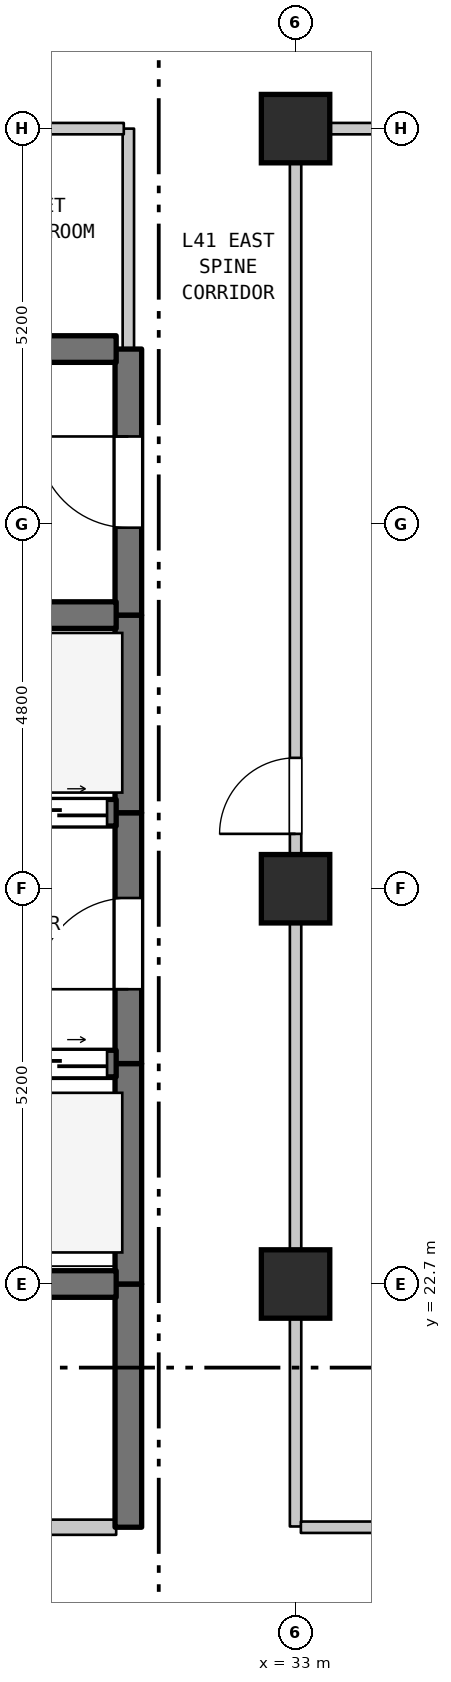
"""IFC4 building model, lengths in metres.
Left out: names, types, materials, properties, quantities, classifications, styles, units other than length and angle.
Written with IfcOpenShell. Run it as: python <this file> out.ifc"""

import sys

from ifc_helpers import new_model, si_unit, direction, frame, frame_2d, origin, origin_2d, place, context, subcontext, project, spatial, rectangle, extrude, element, fill, save


model = new_model("IFC4")
c1 = context("Model", 3, precision=1e-05, world=origin(), true_north=direction((0.0, 1.0)))
c2 = subcontext(c1, "Body", "Model", "MODEL_VIEW")
j1 = project(units=[si_unit("LENGTHUNIT", "METRE"), si_unit("PLANEANGLEUNIT", "RADIAN")], contexts=[c1])
p1 = place(None, origin())
s1 = spatial("IfcSite", under=j1, at=p1, CompositionType="ELEMENT")
p2 = place(p1, origin())
s2 = spatial("IfcBuilding", under=s1, at=p2, CompositionType="ELEMENT")
p3 = place(p2, frame((0.0, 0.0, 169.1)))
s3 = spatial("IfcBuildingStorey", under=s2, at=p3, CompositionType="ELEMENT", Elevation=169.1)
for number, where, z_axis, x_axis in (
    (1, (33.0, 22.7, 0.0), (0.0, 0.0, 1.0), (1.0, 0.0, 0.0)),
    (2, (33.0, 27.9, 0.0), (0.0, 0.0, 1.0), (1.0, 0.0, 0.0)),
    (3, (33.0, 37.9, 0.0), (0.0, 0.0, 1.0), (1.0, 0.0, 0.0)),
):
    element("IfcColumn", number, at=place(p3, frame(where, z_axis=z_axis, x_axis=x_axis)), inside=s3, PredefinedType="COLUMN", context=c2, shape_type="SweptSolid", body=[
        extrude(rectangle(XDim=0.9, YDim=0.9, at=origin_2d()), origin(), (0.0, 0.0, 1.0), 3.7),
    ])
p4 = place(p3, frame((30.8, 19.5, 0.0), z_axis=(0.0, 0.0, 1.0), x_axis=(0.0, 1.0, 0.0)))
e4 = element("IfcWall", 4, at=p4, inside=s3, PredefinedType="SHEAR", context=c2, shape_type="SweptSolid", body=[
    extrude(rectangle(XDim=3.2, YDim=0.35, at=frame_2d((1.6, 0.0))), origin(), (0.0, 0.0, 1.0), 3.39),
])
p5 = place(p3, frame((30.8, 22.7, 0.0), z_axis=(0.0, 0.0, 1.0), x_axis=(0.0, 1.0, 0.0)))
e5 = element("IfcWall", 5, at=p5, inside=s3, PredefinedType="SHEAR", context=c2, shape_type="SweptSolid", body=[
    extrude(rectangle(XDim=2.9, YDim=0.35, at=frame_2d((1.45, 0.0))), origin(), (0.0, 0.0, 1.0), 3.39),
])
p6 = place(p3, frame((30.8, 25.6, 0.0), z_axis=(0.0, 0.0, 1.0), x_axis=(0.0, 1.0, 0.0)))
e6 = element("IfcWall", 6, at=p6, inside=s3, PredefinedType="SHEAR", context=c2, shape_type="SweptSolid", body=[
    extrude(rectangle(XDim=3.3, YDim=0.35, at=frame_2d((1.65, 0.0))), origin(), (0.0, 0.0, 1.0), 3.39),
])
p7 = place(p6, frame((0.978, 0.0, 0.0)))
e7 = element("IfcOpeningElement", 7, at=p7, cuts=e6, PredefinedType="OPENING", context=c2, shape_type="SweptSolid", body=[
    extrude(rectangle(XDim=1.2, YDim=2.2, at=frame_2d((0.6, 1.1))), frame((0.0, 0.185, 0.0), z_axis=(0.0, -1.0, 0.0), x_axis=(1.0, 0.0, 0.0)), (0.0, 0.0, 1.0), 0.37),
])
p8 = place(p3, frame((30.8, 28.9, 0.0), z_axis=(0.0, 0.0, 1.0), x_axis=(0.0, 1.0, 0.0)))
e8 = element("IfcWall", 8, at=p8, inside=s3, PredefinedType="SHEAR", context=c2, shape_type="SweptSolid", body=[
    extrude(rectangle(XDim=2.6, YDim=0.35, at=frame_2d((1.3, 0.0))), origin(), (0.0, 0.0, 1.0), 3.39),
])
p9 = place(p3, frame((30.8, 31.5, 0.0), z_axis=(0.0, 0.0, 1.0), x_axis=(0.0, 1.0, 0.0)))
e9 = element("IfcWall", 9, at=p9, inside=s3, PredefinedType="SHEAR", context=c2, shape_type="SweptSolid", body=[
    extrude(rectangle(XDim=3.5, YDim=0.35, at=frame_2d((1.75, 0.0))), origin(), (0.0, 0.0, 1.0), 3.39),
])
p10 = place(p9, frame((1.15, 0.0, 0.0)))
e10 = element("IfcOpeningElement", 10, at=p10, cuts=e9, PredefinedType="OPENING", context=c2, shape_type="SweptSolid", body=[
    extrude(rectangle(XDim=1.2, YDim=2.2, at=frame_2d((0.6, 1.1))), frame((0.0, 0.185, 0.0), z_axis=(0.0, -1.0, 0.0), x_axis=(1.0, 0.0, 0.0)), (0.0, 0.0, 1.0), 0.37),
])
p11 = place(p3, frame((30.8, 35.0, 0.0), z_axis=(0.0, 0.0, 1.0), x_axis=(0.0, 1.0, 0.0)))
e11 = element("IfcWall", 11, at=p11, inside=s3, PredefinedType="STANDARD", context=c2, shape_type="SweptSolid", body=[
    extrude(rectangle(XDim=2.9, YDim=0.15, at=frame_2d((1.45, 0.0))), origin(), (0.0, 0.0, 1.0), 3.39),
])
p12 = place(p3, frame((33.0, 19.51, 0.0), z_axis=(0.0, 0.0, 1.0), x_axis=(0.0, 1.0, 0.0)))
e12 = element("IfcWall", 12, at=p12, inside=s3, PredefinedType="STANDARD", context=c2, shape_type="SweptSolid", body=[
    extrude(rectangle(XDim=8.39, YDim=0.15, at=frame_2d((4.195, 0.0))), origin(), (0.0, 0.0, 1.0), 2.99),
])
p13 = place(p3, frame((25.985, 19.5, 0.0), z_axis=(0.0, 0.0, 1.0), x_axis=(1.0, 0.0, 0.0)))
e13 = element("IfcWall", 13, at=p13, inside=s3, PredefinedType="STANDARD", context=c2, shape_type="SweptSolid", body=[
    extrude(rectangle(XDim=4.655, YDim=0.2, at=frame_2d((2.327, 0.0))), origin(), (0.0, 0.0, 1.0), 3.39),
])
p14 = place(p13, frame((1.845, 0.0, 0.0)))
e14 = element("IfcOpeningElement", 14, at=p14, cuts=e13, PredefinedType="OPENING", context=c2, shape_type="SweptSolid", body=[
    extrude(rectangle(XDim=0.9, YDim=2.15, at=frame_2d((0.45, 1.075))), frame((0.0, 0.11, 0.0), z_axis=(0.0, -1.0, 0.0), x_axis=(1.0, 0.0, 0.0)), (0.0, 0.0, 1.0), 0.22),
])
p15 = place(p3, frame((33.07, 19.5, 0.0), z_axis=(0.0, 0.0, 1.0), x_axis=(1.0, 0.0, 0.0)))
e15 = element("IfcWall", 15, at=p15, inside=s3, PredefinedType="STANDARD", context=c2, shape_type="SweptSolid", body=[
    extrude(rectangle(XDim=21.51, YDim=0.15, at=frame_2d((10.755, 0.0))), origin(), (0.0, 0.0, 1.0), 3.39),
])
p16 = place(p15, frame((10.185, 0.0, 0.0)))
e16 = element("IfcOpeningElement", 16, at=p16, cuts=e15, PredefinedType="OPENING", context=c2, shape_type="SweptSolid", body=[
    extrude(rectangle(XDim=1.0, YDim=2.15, at=frame_2d((0.5, 1.075))), frame((0.0, 0.085, 0.0), z_axis=(0.0, -1.0, 0.0), x_axis=(1.0, 0.0, 0.0)), (0.0, 0.0, 1.0), 0.17),
])
p17 = place(p3, frame((27.46, 22.7, 0.0), z_axis=(0.0, 0.0, 1.0), x_axis=(1.0, 0.0, 0.0)))
e17 = element("IfcWall", 17, at=p17, inside=s3, PredefinedType="SHEAR", context=c2, shape_type="SweptSolid", body=[
    extrude(rectangle(XDim=3.18, YDim=0.35, at=frame_2d((1.59, 0.0))), origin(), (0.0, 0.0, 1.0), 3.39),
])
p18 = place(p3, frame((27.46, 25.6, 0.0), z_axis=(0.0, 0.0, 1.0), x_axis=(1.0, 0.0, 0.0)))
e18 = element("IfcWall", 18, at=p18, inside=s3, PredefinedType="SHEAR", context=c2, shape_type="SweptSolid", body=[
    extrude(rectangle(XDim=3.18, YDim=0.35, at=frame_2d((1.59, 0.0))), origin(), (0.0, 0.0, 1.0), 3.39),
])
p19 = place(p18, frame((0.12, 0.0, 0.0)))
e19 = element("IfcOpeningElement", 19, at=p19, cuts=e18, PredefinedType="OPENING", context=c2, shape_type="SweptSolid", body=[
    extrude(rectangle(XDim=1.25, YDim=2.2, at=frame_2d((0.625, 1.1))), frame((0.0, 0.185, 0.0), z_axis=(0.0, -1.0, 0.0), x_axis=(1.0, 0.0, 0.0)), (0.0, 0.0, 1.0), 0.37),
])
p20 = place(p18, frame((1.81, 0.0, 0.0)))
e20 = element("IfcOpeningElement", 20, at=p20, cuts=e18, PredefinedType="OPENING", context=c2, shape_type="SweptSolid", body=[
    extrude(rectangle(XDim=1.25, YDim=2.2, at=frame_2d((0.625, 1.1))), frame((0.0, 0.185, 0.0), z_axis=(0.0, -1.0, 0.0), x_axis=(1.0, 0.0, 0.0)), (0.0, 0.0, 1.0), 0.37),
])
p21 = place(p3, frame((27.46, 28.9, 0.0), z_axis=(0.0, 0.0, 1.0), x_axis=(1.0, 0.0, 0.0)))
e21 = element("IfcWall", 21, at=p21, inside=s3, PredefinedType="SHEAR", context=c2, shape_type="SweptSolid", body=[
    extrude(rectangle(XDim=3.18, YDim=0.35, at=frame_2d((1.59, 0.0))), origin(), (0.0, 0.0, 1.0), 3.39),
])
p22 = place(p21, frame((0.12, 0.0, 0.0)))
e22 = element("IfcOpeningElement", 22, at=p22, cuts=e21, PredefinedType="OPENING", context=c2, shape_type="SweptSolid", body=[
    extrude(rectangle(XDim=1.25, YDim=2.2, at=frame_2d((0.625, 1.1))), frame((0.0, 0.185, 0.0), z_axis=(0.0, -1.0, 0.0), x_axis=(1.0, 0.0, 0.0)), (0.0, 0.0, 1.0), 0.37),
])
p23 = place(p21, frame((1.81, 0.0, 0.0)))
e23 = element("IfcOpeningElement", 23, at=p23, cuts=e21, PredefinedType="OPENING", context=c2, shape_type="SweptSolid", body=[
    extrude(rectangle(XDim=1.25, YDim=2.2, at=frame_2d((0.625, 1.1))), frame((0.0, 0.185, 0.0), z_axis=(0.0, -1.0, 0.0), x_axis=(1.0, 0.0, 0.0)), (0.0, 0.0, 1.0), 0.37),
])
p24 = place(p3, frame((27.46, 31.5, 0.0), z_axis=(0.0, 0.0, 1.0), x_axis=(1.0, 0.0, 0.0)))
e24 = element("IfcWall", 24, at=p24, inside=s3, PredefinedType="SHEAR", context=c2, shape_type="SweptSolid", body=[
    extrude(rectangle(XDim=3.18, YDim=0.35, at=frame_2d((1.59, 0.0))), origin(), (0.0, 0.0, 1.0), 3.39),
])
p25 = place(p3, frame((26.645, 35.0, 0.0), z_axis=(0.0, 0.0, 1.0), x_axis=(1.0, 0.0, 0.0)))
e25 = element("IfcWall", 25, at=p25, inside=s3, PredefinedType="SHEAR", context=c2, shape_type="SweptSolid", body=[
    extrude(rectangle(XDim=3.995, YDim=0.35, at=frame_2d((1.998, 0.0))), origin(), (0.0, 0.0, 1.0), 3.39),
])
p26 = place(p25, frame((1.508, 0.0, 0.0)))
e26 = element("IfcOpeningElement", 26, at=p26, cuts=e25, PredefinedType="OPENING", context=c2, shape_type="SweptSolid", body=[
    extrude(rectangle(XDim=0.95, YDim=2.15, at=frame_2d((0.475, 1.075))), frame((0.0, 0.185, 0.0), z_axis=(0.0, -1.0, 0.0), x_axis=(1.0, 0.0, 0.0)), (0.0, 0.0, 1.0), 0.37),
])
p27 = place(p3, frame((26.645, 37.9, 0.0), z_axis=(0.0, 0.0, 1.0), x_axis=(1.0, 0.0, 0.0)))
e27 = element("IfcWall", 27, at=p27, inside=s3, PredefinedType="STANDARD", context=c2, shape_type="SweptSolid", body=[
    extrude(rectangle(XDim=4.095, YDim=0.15, at=frame_2d((2.047, 0.0))), origin(), (0.0, 0.0, 1.0), 2.89),
])
p28 = place(p3, frame((33.07, 37.9, 0.0), z_axis=(0.0, 0.0, 1.0), x_axis=(1.0, 0.0, 0.0)))
e28 = element("IfcWall", 28, at=p28, inside=s3, PredefinedType="STANDARD", context=c2, shape_type="SweptSolid", body=[
    extrude(rectangle(XDim=7.155, YDim=0.15, at=frame_2d((3.578, 0.0))), origin(), (0.0, 0.0, 1.0), 3.39),
])
p29 = place(p3, frame((33.0, 27.9, 0.0), z_axis=(0.0, 0.0, 1.0), x_axis=(0.0, 1.0, 0.0)))
e29 = element("IfcWall", 29, at=p29, inside=s3, PredefinedType="STANDARD", context=c2, shape_type="SweptSolid", body=[
    extrude(rectangle(XDim=9.99, YDim=0.15, at=frame_2d((4.995, 0.0))), origin(), (0.0, 0.0, 1.0), 2.89),
])
p30 = place(p29, frame((0.722, 0.0, 0.0)))
e30 = element("IfcOpeningElement", 30, at=p30, cuts=e29, PredefinedType="OPENING", context=c2, shape_type="SweptSolid", body=[
    extrude(rectangle(XDim=1.0, YDim=2.15, at=frame_2d((0.5, 1.075))), frame((0.0, 0.085, 0.0), z_axis=(0.0, -1.0, 0.0), x_axis=(1.0, 0.0, 0.0)), (0.0, 0.0, 1.0), 0.17),
])
p31 = place(p7, origin())
e31 = element("IfcDoor", 31, at=p31, inside=s3, OperationType="SINGLE_SWING_LEFT", PredefinedType="DOOR", context=c2, shape_type="SweptSolid", body=[
    extrude(rectangle(XDim=1.2, YDim=2.2, at=frame_2d((0.6, 1.1))), frame((0.0, 0.025, 0.0), z_axis=(0.0, -1.0, 0.0), x_axis=(1.0, 0.0, 0.0)), (0.0, 0.0, 1.0), 0.05),
])
fill(e7, e31)
p32 = place(p10, origin())
e32 = element("IfcDoor", 32, at=p32, inside=s3, OperationType="SINGLE_SWING_RIGHT", PredefinedType="DOOR", context=c2, shape_type="SweptSolid", body=[
    extrude(rectangle(XDim=1.2, YDim=2.2, at=frame_2d((0.6, 1.1))), frame((0.0, 0.025, 0.0), z_axis=(0.0, -1.0, 0.0), x_axis=(1.0, 0.0, 0.0)), (0.0, 0.0, 1.0), 0.05),
])
fill(e10, e32)
p33 = place(p30, origin())
e33 = element("IfcDoor", 33, at=p33, inside=s3, OperationType="SINGLE_SWING_LEFT", PredefinedType="DOOR", context=c2, shape_type="SweptSolid", body=[
    extrude(rectangle(XDim=1.0, YDim=2.15, at=frame_2d((0.5, 1.075))), frame((0.0, 0.025, 0.0), z_axis=(0.0, -1.0, 0.0), x_axis=(1.0, 0.0, 0.0)), (0.0, 0.0, 1.0), 0.05),
])
fill(e30, e33)
p34 = place(p20, origin())
e34 = element("IfcDoor", 34, at=p34, inside=s3, OperationType="DOUBLE_DOOR_SLIDING", PredefinedType="DOOR", context=c2, shape_type="SweptSolid", body=[
    extrude(rectangle(XDim=1.25, YDim=2.2, at=frame_2d((0.625, 1.1))), frame((0.0, 0.025, 0.0), z_axis=(0.0, -1.0, 0.0), x_axis=(1.0, 0.0, 0.0)), (0.0, 0.0, 1.0), 0.05),
])
fill(e20, e34)
p35 = place(p23, origin())
e35 = element("IfcDoor", 35, at=p35, inside=s3, OperationType="DOUBLE_DOOR_SLIDING", PredefinedType="DOOR", context=c2, shape_type="SweptSolid", body=[
    extrude(rectangle(XDim=1.25, YDim=2.2, at=frame_2d((0.625, 1.1))), frame((0.0, 0.025, 0.0), z_axis=(0.0, -1.0, 0.0), x_axis=(1.0, 0.0, 0.0)), (0.0, 0.0, 1.0), 0.05),
])
fill(e23, e35)
save(model, sys.argv[1])
